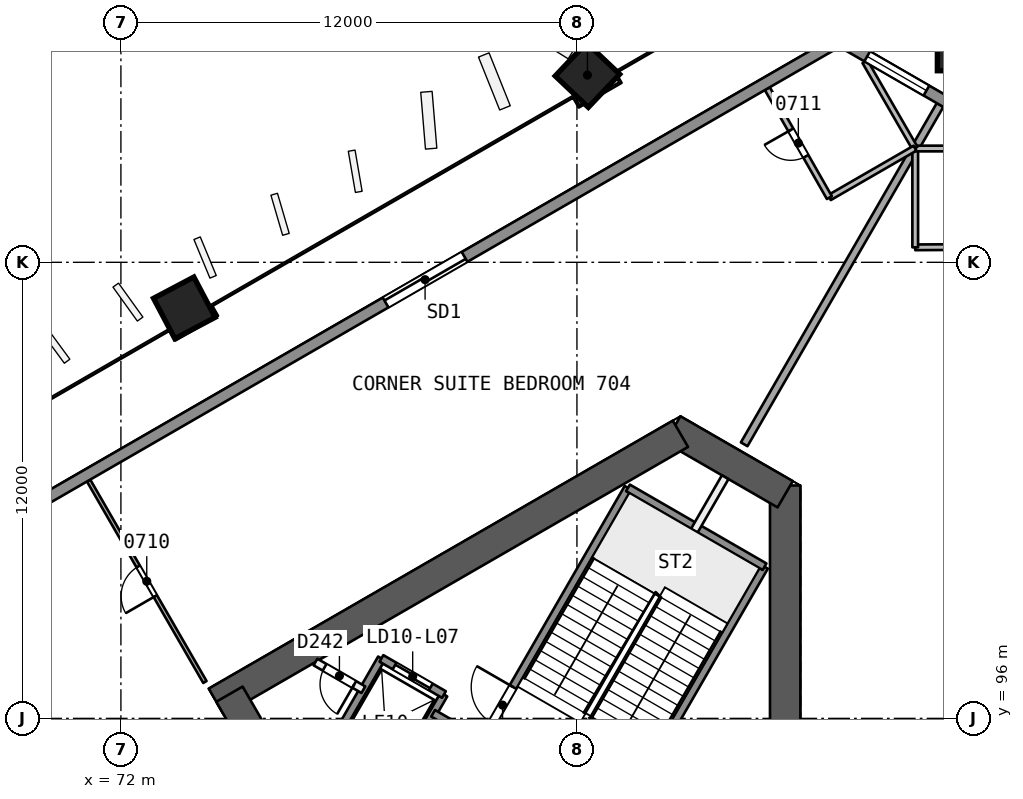
"""IFC4 building model, lengths in metres.
Left out: names, types, materials, properties, quantities, classifications, styles, units other than length and angle.
Written with IfcOpenShell. Run it as: python <this file> out.ifc"""

import sys

from ifc_helpers import new_model, si_unit, direction, frame, frame_2d, origin, origin_2d, place, context, subcontext, project, spatial, rectangle, extrude, element, fill, save


model = new_model("IFC4")
c1 = context("Model", 3, precision=1e-05, world=origin(), true_north=direction((0.0, 1.0)))
c2 = subcontext(c1, "Body", "Model", "MODEL_VIEW")
j1 = project(units=[si_unit("LENGTHUNIT", "METRE"), si_unit("PLANEANGLEUNIT", "RADIAN")], contexts=[c1])
p1 = place(None, origin())
s1 = spatial("IfcSite", under=j1, at=p1, CompositionType="ELEMENT")
p2 = place(p1, origin())
s2 = spatial("IfcBuilding", under=s1, at=p2, CompositionType="ELEMENT")
p3 = place(p2, frame((0.0, 0.0, 37.4)))
s3 = spatial("IfcBuildingStorey", under=s2, at=p3, CompositionType="ELEMENT", Elevation=37.4)
p4 = place(p3, frame((89.48, 88.194, 0.0), z_axis=(0.0, 0.0, 1.0), x_axis=(0.0, 1.0, 0.0)))
e1 = element("IfcWall", 1, at=p4, inside=s3, PredefinedType="SHEAR", context=c2, shape_type="SweptSolid", body=[
    extrude(rectangle(XDim=13.933, YDim=0.8, at=frame_2d((6.967, 0.0))), origin(), (0.0, 0.0, 1.0), 3.7),
])
p5 = place(p3, frame((89.48, 101.897, 0.0), z_axis=(0.0, 0.0, 1.0), x_axis=(-0.866034355626, 0.499984494636, 0.0)))
e2 = element("IfcWall", 2, at=p5, inside=s3, PredefinedType="SHEAR", context=c2, shape_type="SweptSolid", body=[
    extrude(rectangle(XDim=3.414, YDim=0.8, at=frame_2d((1.707, 0.0))), origin(), (0.0, 0.0, 1.0), 3.7),
])
p6 = place(p3, frame((86.723, 103.488, 0.0), z_axis=(0.0, 0.0, 1.0), x_axis=(-0.866032504327, -0.499987701298, 0.0)))
e3 = element("IfcWall", 3, at=p6, inside=s3, PredefinedType="SHEAR", context=c2, shape_type="SweptSolid", body=[
    extrude(rectangle(XDim=14.102, YDim=0.8, at=frame_2d((7.051, 0.0))), origin(), (0.0, 0.0, 1.0), 3.7),
])
p7 = place(p3, frame((74.856, 96.637, 0.0), z_axis=(0.0, 0.0, 1.0), x_axis=(0.499993500917, -0.866029155999, 0.0)))
e4 = element("IfcWall", 4, at=p7, inside=s3, PredefinedType="SHEAR", context=c2, shape_type="SweptSolid", body=[
    extrude(rectangle(XDim=9.98, YDim=0.8, at=frame_2d((4.99, 0.0))), origin(), (0.0, 0.0, 1.0), 3.7),
])
p8 = place(p7, frame((7.83, 0.0, 0.0)))
e5 = element("IfcOpeningElement", 5, at=p8, cuts=e4, PredefinedType="OPENING", context=c2, shape_type="SweptSolid", body=[
    extrude(rectangle(XDim=1.2, YDim=2.1, at=frame_2d((0.6, 1.05))), frame((0.0, 0.411, 0.0), z_axis=(0.0, -1.0, 0.0), x_axis=(1.0, 0.0, 0.0)), (0.0, 0.0, 1.0), 0.821),
])
p9 = place(p3, frame((94.905, 114.477, 0.0), z_axis=(-0.017605877014, -0.030464101799, 0.99938079409), x_axis=(0.86581098392, -0.500371202332, 2.456e-09)))
e6 = element("IfcColumn", 6, at=p9, inside=s3, PredefinedType="COLUMN", context=c2, shape_type="SweptSolid", body=[
    extrude(rectangle(XDim=2.8, YDim=2.8, at=origin_2d()), origin(), (0.0, 0.0, 1.0), 3.702),
])
p10 = place(p3, frame((84.287, 112.96, 0.0), z_axis=(-0.008375902173, -0.028161497857, 0.999568293966), x_axis=(0.865852192858, 0.499844650908, 0.02133787902)))
e7 = element("IfcColumn", 7, at=p10, inside=s3, PredefinedType="COLUMN", context=c2, shape_type="SweptSolid", body=[
    extrude(rectangle(XDim=1.2, YDim=1.2, at=origin_2d()), origin(), (0.0, 0.0, 1.0), 3.702),
])
p11 = place(p3, frame((73.668, 106.829, 0.0), z_axis=(0.000857522362, -0.02282328747, 0.99973914708), x_axis=(0.866060219166, 0.499825864794, 0.010667786116)))
e8 = element("IfcColumn", 8, at=p11, inside=s3, PredefinedType="COLUMN", context=c2, shape_type="SweptSolid", body=[
    extrude(rectangle(XDim=1.2, YDim=1.2, at=origin_2d()), origin(), (0.0, 0.0, 1.0), 3.701),
])
p12 = place(p3, frame((96.202, 108.413, 0.0), z_axis=(0.0, 0.0, 1.0), x_axis=(-0.999983351016, -0.005770415135, 0.0)))
e9 = element("IfcWall", 9, at=p12, inside=s3, PredefinedType="PARTITIONING", context=c2, shape_type="SweptSolid", body=[
    extrude(rectangle(XDim=3.3, YDim=0.15, at=frame_2d((1.65, 0.0))), origin(), (0.0, 0.0, 1.0), 3.2),
])
p13 = place(p12, frame((1.25, 0.0, 0.0)))
e10 = element("IfcOpeningElement", 10, at=p13, cuts=e9, PredefinedType="OPENING", context=c2, shape_type="SweptSolid", body=[
    extrude(rectangle(XDim=0.8, YDim=2.1, at=frame_2d((0.4, 1.05))), frame((0.0, 0.085, 0.0), z_axis=(0.0, -1.0, 0.0), x_axis=(1.0, 0.0, 0.0)), (0.0, 0.0, 1.0), 0.171),
])
p14 = place(p3, frame((92.902, 108.394, 0.0), z_axis=(0.0, 0.0, 1.0), x_axis=(0.0, 1.0, 0.0)))
e11 = element("IfcWall", 11, at=p14, inside=s3, PredefinedType="PARTITIONING", context=c2, shape_type="SweptSolid", body=[
    extrude(rectangle(XDim=2.6, YDim=0.15, at=frame_2d((1.3, 0.0))), origin(), (0.0, 0.0, 1.0), 3.2),
])
p15 = place(p3, frame((92.902, 110.994, 0.0), z_axis=(0.0, 0.0, 1.0), x_axis=(1.0, 0.0, 0.0)))
e12 = element("IfcWall", 12, at=p15, inside=s3, PredefinedType="PARTITIONING", context=c2, shape_type="SweptSolid", body=[
    extrude(rectangle(XDim=2.637, YDim=0.15, at=frame_2d((1.319, 0.0))), origin(), (0.0, 0.0, 1.0), 3.2),
])
p16 = place(p3, frame((93.556, 112.139, 0.0), z_axis=(0.0, 0.0, 1.0), x_axis=(-0.499997833203, -0.866026654782, 0.0)))
e13 = element("IfcWall", 13, at=p16, inside=s3, PredefinedType="PARTITIONING", context=c2, shape_type="SweptSolid", body=[
    extrude(rectangle(XDim=10.309, YDim=0.2, at=frame_2d((5.155, 0.0))), origin(), (0.0, 0.0, 1.0), 3.2),
])
p17 = place(p3, frame((74.21, 96.956, 0.0), z_axis=(0.0, 0.0, 1.0), x_axis=(-0.499985929336, 0.866033527334, 0.0)))
e14 = element("IfcWall", 14, at=p17, inside=s3, PredefinedType="PARTITIONING", context=c2, shape_type="SweptSolid", body=[
    extrude(rectangle(XDim=6.123, YDim=0.1, at=frame_2d((3.062, 0.0))), origin(), (0.0, 0.0, 1.0), 3.2),
])
p18 = place(p17, frame((2.611, 0.0, 0.0)))
e15 = element("IfcOpeningElement", 15, at=p18, cuts=e14, PredefinedType="OPENING", context=c2, shape_type="SweptSolid", body=[
    extrude(rectangle(XDim=0.9, YDim=2.1, at=frame_2d((0.45, 1.05))), frame((0.0, 0.061, 0.0), z_axis=(0.0, -1.0, 0.0), x_axis=(1.0, 0.0, 0.0)), (0.0, 0.0, 1.0), 0.121),
])
p19 = place(p3, frame((65.749, 99.141, 0.0), z_axis=(0.0, 0.0, 1.0), x_axis=(0.499997206141, -0.866027016814, 0.0)))
e16 = element("IfcWall", 16, at=p19, inside=s3, PredefinedType="PARTITIONING", context=c2, shape_type="SweptSolid", body=[
    extrude(rectangle(XDim=14.102, YDim=0.2, at=frame_2d((7.051, 0.0))), origin(), (0.0, 0.0, 1.0), 3.2),
])
p20 = place(p3, frame((91.579, 113.28, 0.0), z_axis=(0.0, 0.0, 1.0), x_axis=(0.500051830632, -0.865995477287, 0.0)))
e17 = element("IfcWall", 17, at=p20, inside=s3, PredefinedType="PARTITIONING", context=c2, shape_type="SweptSolid", body=[
    extrude(rectangle(XDim=2.631, YDim=0.15, at=frame_2d((1.315, 0.0))), origin(), (0.0, 0.0, 1.0), 3.2),
])
p21 = place(p3, frame((92.895, 111.002, 0.0), z_axis=(0.0, 0.0, 1.0), x_axis=(-0.866021400173, -0.500006934395, 0.0)))
e18 = element("IfcWall", 18, at=p21, inside=s3, PredefinedType="PARTITIONING", context=c2, shape_type="SweptSolid", body=[
    extrude(rectangle(XDim=2.6, YDim=0.15, at=frame_2d((1.3, 0.0))), origin(), (0.0, 0.0, 1.0), 3.2),
])
p22 = place(p3, frame((90.643, 109.702, 0.0), z_axis=(0.0, 0.0, 1.0), x_axis=(-0.494999221434, 0.868893417388, 0.0)))
e19 = element("IfcWall", 19, at=p22, inside=s3, PredefinedType="PARTITIONING", context=c2, shape_type="SweptSolid", body=[
    extrude(rectangle(XDim=3.3, YDim=0.15, at=frame_2d((1.65, 0.0))), origin(), (0.0, 0.0, 1.0), 3.2),
])
p23 = place(p22, frame((1.25, 0.0, 0.0)))
e20 = element("IfcOpeningElement", 20, at=p23, cuts=e19, PredefinedType="OPENING", context=c2, shape_type="SweptSolid", body=[
    extrude(rectangle(XDim=0.8, YDim=2.1, at=frame_2d((0.4, 1.05))), frame((0.0, 0.085, 0.0), z_axis=(0.0, -1.0, 0.0), x_axis=(1.0, 0.0, 0.0)), (0.0, 0.0, 1.0), 0.171),
])
p24 = place(p3, frame((90.91, 113.839, 0.0), z_axis=(0.0, 0.0, 1.0), x_axis=(0.866022511254, -0.500005009975, 0.0)))
e21 = element("IfcWall", 21, at=p24, inside=s3, PredefinedType="SOLIDWALL", context=c2, shape_type="SweptSolid", body=[
    extrude(rectangle(XDim=6.283, YDim=0.3, at=frame_2d((3.141, 0.0))), origin(), (0.0, 0.0, 1.0), 3.2),
])
p25 = place(p24, frame((3.646, 0.0, 0.9)))
e22 = element("IfcOpeningElement", 22, at=p25, cuts=e21, PredefinedType="OPENING", context=c2, shape_type="SweptSolid", body=[
    extrude(rectangle(XDim=1.8, YDim=1.5, at=frame_2d((0.9, 0.75))), frame((0.0, 0.161, 0.0), z_axis=(0.0, -1.0, 0.0), x_axis=(1.0, 0.0, 0.0)), (0.0, 0.0, 1.0), 0.321),
])
p26 = place(p24, frame((0.841, 0.0, 0.9)))
e23 = element("IfcOpeningElement", 23, at=p26, cuts=e21, PredefinedType="OPENING", context=c2, shape_type="SweptSolid", body=[
    extrude(rectangle(XDim=1.8, YDim=1.5, at=frame_2d((0.9, 0.75))), frame((0.0, 0.161, 0.0), z_axis=(0.0, -1.0, 0.0), x_axis=(1.0, 0.0, 0.0)), (0.0, 0.0, 1.0), 0.321),
])
p27 = place(p3, frame((37.74, 83.141, 0.0), z_axis=(0.0, 0.0, 1.0), x_axis=(0.866026524777, 0.499998058379, 0.0)))
e24 = element("IfcWall", 24, at=p27, inside=s3, PredefinedType="SOLIDWALL", context=c2, shape_type="SweptSolid", body=[
    extrude(rectangle(XDim=61.395, YDim=0.3, at=frame_2d((30.698, 0.0))), origin(), (0.0, 0.0, 1.0), 3.2),
])
p28 = place(p27, frame((34.174, 0.0, 0.0)))
e25 = element("IfcOpeningElement", 25, at=p28, cuts=e24, PredefinedType="OPENING", context=c2, shape_type="SweptSolid", body=[
    extrude(rectangle(XDim=2.4, YDim=2.4, at=frame_2d((1.2, 1.2))), frame((0.0, 0.161, 0.0), z_axis=(0.0, -1.0, 0.0), x_axis=(1.0, 0.0, 0.0)), (0.0, 0.0, 1.0), 0.321),
])
p29 = place(p27, frame((47.603, 0.0, 0.0)))
e26 = element("IfcOpeningElement", 26, at=p29, cuts=e24, PredefinedType="OPENING", context=c2, shape_type="SweptSolid", body=[
    extrude(rectangle(XDim=2.4, YDim=2.4, at=frame_2d((1.2, 1.2))), frame((0.0, 0.161, 0.0), z_axis=(0.0, -1.0, 0.0), x_axis=(1.0, 0.0, 0.0)), (0.0, 0.0, 1.0), 0.321),
])
p30 = place(p27, frame((24.198, 0.0, 0.0)))
e27 = element("IfcOpeningElement", 27, at=p30, cuts=e24, PredefinedType="OPENING", context=c2, shape_type="SweptSolid", body=[
    extrude(rectangle(XDim=2.4, YDim=2.4, at=frame_2d((1.2, 1.2))), frame((0.0, 0.161, 0.0), z_axis=(0.0, -1.0, 0.0), x_axis=(1.0, 0.0, 0.0)), (0.0, 0.0, 1.0), 0.321),
])
p31 = place(p27, frame((11.394, 0.0, 0.0)))
e28 = element("IfcOpeningElement", 28, at=p31, cuts=e24, PredefinedType="OPENING", context=c2, shape_type="SweptSolid", body=[
    extrude(rectangle(XDim=2.4, YDim=2.4, at=frame_2d((1.2, 1.2))), frame((0.0, 0.161, 0.0), z_axis=(0.0, -1.0, 0.0), x_axis=(1.0, 0.0, 0.0)), (0.0, 0.0, 1.0), 0.321),
])
p32 = place(p27, frame((28.874, 0.0, 0.0)))
e29 = element("IfcOpeningElement", 29, at=p32, cuts=e24, PredefinedType="OPENING", context=c2, shape_type="SweptSolid", body=[
    extrude(rectangle(XDim=2.4, YDim=2.4, at=frame_2d((1.2, 1.2))), frame((0.0, 0.161, 0.0), z_axis=(0.0, -1.0, 0.0), x_axis=(1.0, 0.0, 0.0)), (0.0, 0.0, 1.0), 0.321),
])
p33 = place(p3, frame((85.087, 93.321, 0.0), z_axis=(0.0, 0.0, 1.0), x_axis=(0.500019787375, 0.866013979237, 0.0)))
e30 = element("IfcWall", 30, at=p33, inside=s3, PredefinedType="SOLIDWALL", context=c2, shape_type="SweptSolid", body=[
    extrude(rectangle(XDim=7.7, YDim=0.2, at=frame_2d((3.85, 0.0))), origin(), (0.0, 0.0, 1.0), 3.2),
])
p34 = place(p3, frame((87.09, 100.94, 0.0), z_axis=(0.0, 0.0, 1.0), x_axis=(0.499956811548, 0.866050337213, 0.0)))
e31 = element("IfcWall", 31, at=p34, inside=s3, PredefinedType="PARTITIONING", context=c2, shape_type="SweptSolid", body=[
    extrude(rectangle(XDim=1.623, YDim=0.2, at=frame_2d((0.812, 0.0))), origin(), (0.0, 0.0, 1.0), 3.2),
])
p35 = place(p3, frame((81.493, 95.396, 0.0), z_axis=(0.0, 0.0, 1.0), x_axis=(0.500006057782, 0.866021906294, 0.0)))
e32 = element("IfcWall", 32, at=p35, inside=s3, PredefinedType="SOLIDWALL", context=c2, shape_type="SweptSolid", body=[
    extrude(rectangle(XDim=7.7, YDim=0.2, at=frame_2d((3.85, 0.0))), origin(), (0.0, 0.0, 1.0), 3.2),
])
p36 = place(p35, frame((0.55, 0.0, 0.0)))
e33 = element("IfcOpeningElement", 33, at=p36, cuts=e32, PredefinedType="OPENING", context=c2, shape_type="SweptSolid", body=[
    extrude(rectangle(XDim=1.1, YDim=2.1, at=frame_2d((0.55, 1.05))), frame((0.0, 0.11, 0.0), z_axis=(0.0, -1.0, 0.0), x_axis=(1.0, 0.0, 0.0)), (0.0, 0.0, 1.0), 0.221),
])
for number, where, z_axis, x_axis in (
    (34, (78.976, 93.986, 0.0), (0.0, 0.0, 1.0), (0.5, 0.866, 0.0)),
    (35, (77.33, 94.936, 0.0), (0.0, 0.0, 1.0), (0.5, 0.866, 0.0)),
):
    element("IfcWall", number, at=place(p3, frame(where, z_axis=z_axis, x_axis=x_axis)), inside=s3, PredefinedType="SOLIDWALL", context=c2, shape_type="SweptSolid", body=[
        extrude(rectangle(XDim=3.05, YDim=0.2, at=frame_2d((1.525, 0.0))), origin(), (0.0, 0.0, 1.0), 3.2),
    ])
p37 = place(p3, frame((78.38, 96.755, 0.0), z_axis=(0.0, 0.0, 1.0), x_axis=(-0.866003949776, 0.500037157592, 0.0)))
e36 = element("IfcWall", 36, at=p37, inside=s3, PredefinedType="PARTITIONING", context=c2, shape_type="SweptSolid", body=[
    extrude(rectangle(XDim=1.455, YDim=0.2, at=frame_2d((0.728, 0.0))), origin(), (0.0, 0.0, 1.0), 3.2),
])
p38 = place(p37, frame((0.278, 0.0, 0.0)))
e37 = element("IfcOpeningElement", 37, at=p38, cuts=e36, PredefinedType="OPENING", context=c2, shape_type="SweptSolid", body=[
    extrude(rectangle(XDim=0.9, YDim=2.1, at=frame_2d((0.45, 1.05))), frame((0.0, 0.11, 0.0), z_axis=(0.0, -1.0, 0.0), x_axis=(1.0, 0.0, 0.0)), (0.0, 0.0, 1.0), 0.221),
])
p39 = place(p3, frame((88.01, 91.634, 0.0), z_axis=(0.0, 0.0, 1.0), x_axis=(-0.866024315419, 0.5000018851, 0.0)))
e38 = element("IfcWall", 38, at=p39, inside=s3, PredefinedType="SOLIDWALL", context=c2, shape_type="SweptSolid", body=[
    extrude(rectangle(XDim=9.0, YDim=0.2, at=frame_2d((4.5, 0.0))), origin(), (0.0, 0.0, 1.0), 3.2),
])
p40 = place(p3, frame((80.5, 96.627, 0.0), z_axis=(0.0, 0.0, 1.0), x_axis=(-0.86601224135, 0.500022797313, 0.0)))
e39 = element("IfcWall", 39, at=p40, inside=s3, PredefinedType="SOLIDWALL", context=c2, shape_type="SweptSolid", body=[
    extrude(rectangle(XDim=1.9, YDim=0.2, at=frame_2d((0.95, 0.0))), origin(), (0.0, 0.0, 1.0), 3.2),
])
p41 = place(p40, frame((0.4, 0.0, 0.0)))
e40 = element("IfcOpeningElement", 40, at=p41, cuts=e39, PredefinedType="OPENING", context=c2, shape_type="SweptSolid", body=[
    extrude(rectangle(XDim=1.1, YDim=2.1, at=frame_2d((0.55, 1.05))), frame((0.0, 0.11, 0.0), z_axis=(0.0, -1.0, 0.0), x_axis=(1.0, 0.0, 0.0)), (0.0, 0.0, 1.0), 0.221),
])
p42 = place(p3, frame((88.937, 99.99, 0.0), z_axis=(0.0, 0.0, 1.0), x_axis=(-0.866004344652, 0.500036473714, 0.0)))
e41 = element("IfcWall", 41, at=p42, inside=s3, PredefinedType="SOLIDWALL", context=c2, shape_type="SweptSolid", body=[
    extrude(rectangle(XDim=4.15, YDim=0.2, at=frame_2d((2.075, 0.0))), origin(), (0.0, 0.0, 1.0), 3.2),
])
p43 = place(p18, origin())
e42 = element("IfcDoor", 42, at=p43, inside=s3, OperationType="SINGLE_SWING_LEFT", PredefinedType="NOTDEFINED", context=c2, shape_type="SweptSolid", body=[
    extrude(rectangle(XDim=0.9, YDim=2.1, at=frame_2d((0.45, 1.05))), frame((0.0, 0.025, 0.0), z_axis=(0.0, -1.0, 0.0), x_axis=(1.0, 0.0, 0.0)), (0.0, 0.0, 1.0), 0.05),
])
fill(e15, e42)
p44 = place(p23, origin())
e43 = element("IfcDoor", 43, at=p44, inside=s3, OperationType="SINGLE_SWING_RIGHT", PredefinedType="NOTDEFINED", context=c2, shape_type="SweptSolid", body=[
    extrude(rectangle(XDim=0.8, YDim=2.1, at=frame_2d((0.4, 1.05))), frame((0.0, 0.025, 0.0), z_axis=(0.0, -1.0, 0.0), x_axis=(1.0, 0.0, 0.0)), (0.0, 0.0, 1.0), 0.05),
])
fill(e20, e43)
p45 = place(p26, origin())
e44 = element("IfcWindow", 44, at=p45, inside=s3, PartitioningType="SINGLE_PANEL", PredefinedType="WINDOW", context=c2, shape_type="SweptSolid", body=[
    extrude(rectangle(XDim=1.8, YDim=1.5, at=frame_2d((0.9, 0.75))), frame((0.0, 0.03, 0.0), z_axis=(0.0, -1.0, 0.0), x_axis=(1.0, 0.0, 0.0)), (0.0, 0.0, 1.0), 0.06),
])
fill(e23, e44)
p46 = place(p29, origin())
e45 = element("IfcDoor", 45, at=p46, inside=s3, OperationType="SLIDING_TO_RIGHT", PredefinedType="NOTDEFINED", context=c2, shape_type="SweptSolid", body=[
    extrude(rectangle(XDim=2.4, YDim=2.4, at=frame_2d((1.2, 1.2))), frame((0.0, 0.025, 0.0), z_axis=(0.0, -1.0, 0.0), x_axis=(1.0, 0.0, 0.0)), (0.0, 0.0, 1.0), 0.05),
])
fill(e26, e45)
p47 = place(p41, origin())
e46 = element("IfcDoor", 46, at=p47, inside=s3, OperationType="SLIDING_TO_RIGHT", PredefinedType="NOTDEFINED", context=c2, shape_type="SweptSolid", body=[
    extrude(rectangle(XDim=1.1, YDim=2.1, at=frame_2d((0.55, 1.05))), frame((0.0, 0.025, 0.0), z_axis=(0.0, -1.0, 0.0), x_axis=(1.0, 0.0, 0.0)), (0.0, 0.0, 1.0), 0.05),
])
fill(e40, e46)
p48 = place(p38, origin())
e47 = element("IfcDoor", 47, at=p48, inside=s3, OperationType="SINGLE_SWING_LEFT", PredefinedType="NOTDEFINED", context=c2, shape_type="SweptSolid", body=[
    extrude(rectangle(XDim=0.9, YDim=2.1, at=frame_2d((0.45, 1.05))), frame((0.0, 0.025, 0.0), z_axis=(0.0, -1.0, 0.0), x_axis=(1.0, 0.0, 0.0)), (0.0, 0.0, 1.0), 0.05),
])
fill(e37, e47)
p49 = place(p36, origin())
e48 = element("IfcDoor", 48, at=p49, inside=s3, OperationType="SINGLE_SWING_RIGHT", PredefinedType="NOTDEFINED", context=c2, shape_type="SweptSolid", body=[
    extrude(rectangle(XDim=1.1, YDim=2.1, at=frame_2d((0.55, 1.05))), frame((0.0, 0.025, 0.0), z_axis=(0.0, -1.0, 0.0), x_axis=(1.0, 0.0, 0.0)), (0.0, 0.0, 1.0), 0.05),
])
fill(e33, e48)
save(model, sys.argv[1])
